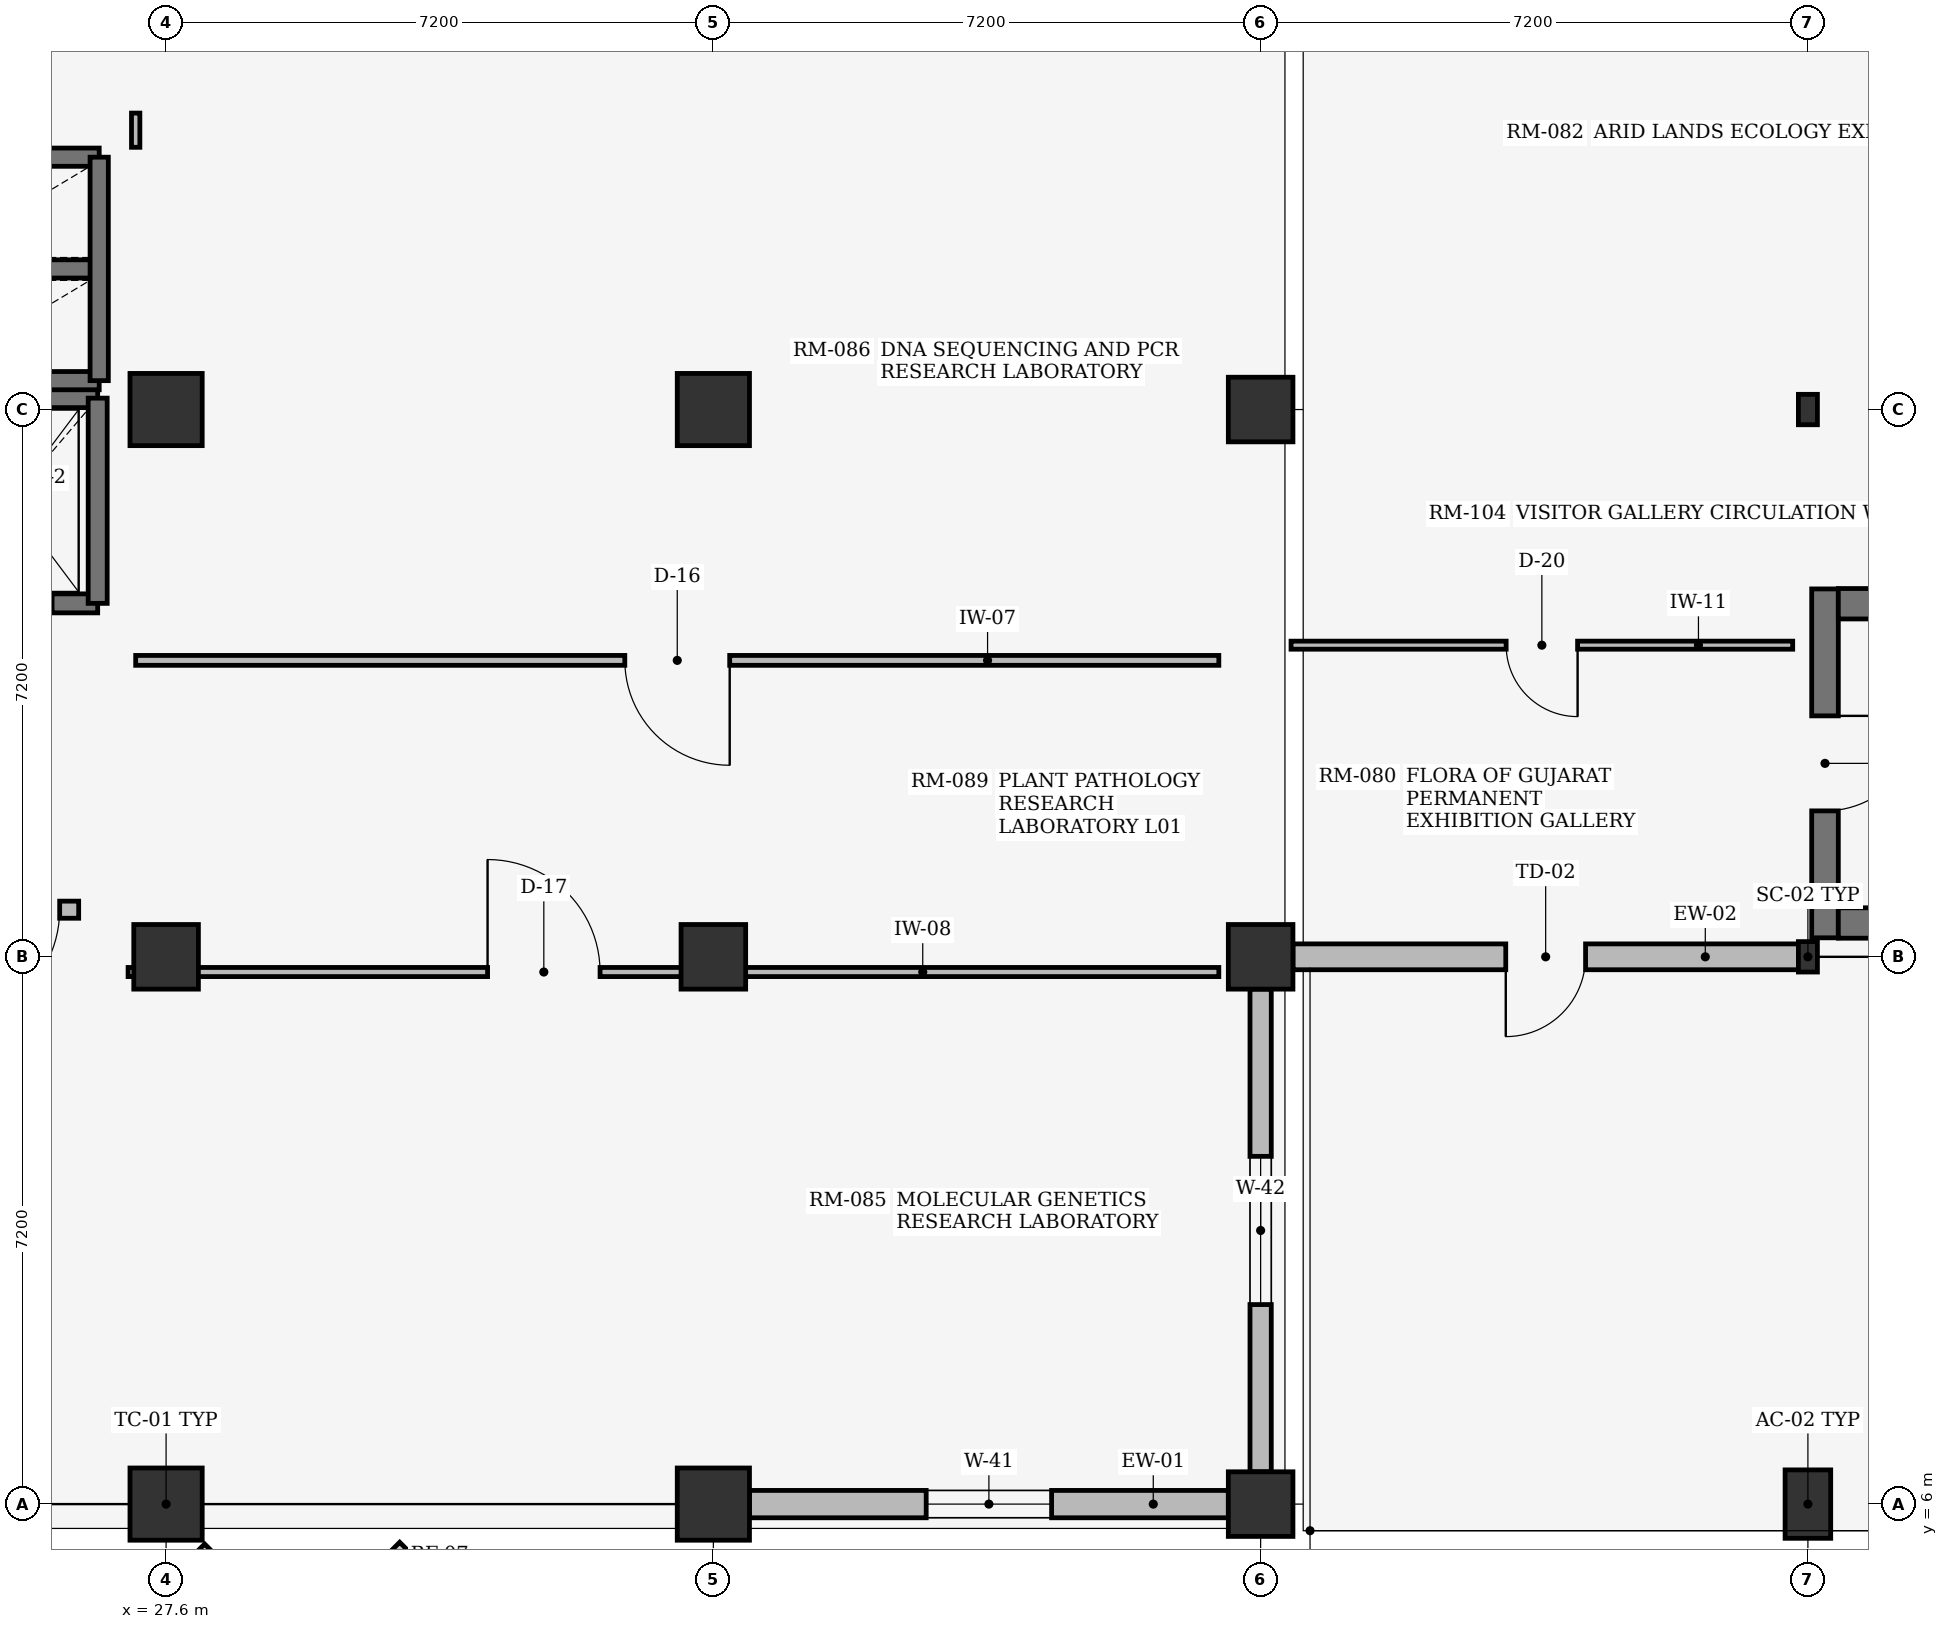
"""IFC4 building model, lengths in metres.
Left out: names, types, materials, properties, quantities, classifications, styles, units other than length and angle.
Written with IfcOpenShell. Run it as: python <this file> out.ifc"""

import sys

from ifc_helpers import new_model, si_unit, direction, frame, frame_2d, origin, origin_2d, place, context, subcontext, project, spatial, rectangle, i_section, extrude, element, fill, save


model = new_model("IFC4")
c1 = context("Model", 3, precision=1e-05, world=origin(), true_north=direction((0.0, 1.0)))
c2 = subcontext(c1, "Body", "Model", "MODEL_VIEW")
j1 = project(units=[si_unit("LENGTHUNIT", "METRE"), si_unit("PLANEANGLEUNIT", "RADIAN")], contexts=[c1])
p1 = place(None, origin())
s1 = spatial("IfcSite", under=j1, at=p1, CompositionType="ELEMENT")
p2 = place(p1, origin())
s2 = spatial("IfcBuilding", under=s1, at=p2, CompositionType="ELEMENT")
p3 = place(p2, frame((0.0, 0.0, 4.8)))
s3 = spatial("IfcBuildingStorey", under=s2, at=p3, CompositionType="ELEMENT", Elevation=4.8)
p4 = place(p3, frame((27.6, 6.0, 0.0), z_axis=(0.0, 0.0, 1.0), x_axis=(1.0, 0.0, 0.0)))
e1 = element("IfcColumn", 1, at=p4, inside=s3, PredefinedType="COLUMN", context=c2, shape_type="SweptSolid", body=[
    extrude(rectangle(XDim=0.95, YDim=0.95, at=origin_2d()), origin(), (0.0, 0.0, 1.0), 3.95),
])
p5 = place(p3, frame((27.6, 13.2, 0.0), z_axis=(0.0, 0.0, 1.0), x_axis=(1.0, 0.0, 0.0)))
e2 = element("IfcColumn", 2, at=p5, inside=s3, PredefinedType="COLUMN", context=c2, shape_type="SweptSolid", body=[
    extrude(rectangle(XDim=0.85, YDim=0.85, at=origin_2d()), origin(), (0.0, 0.0, 1.0), 3.95),
])
for number, where, z_axis, x_axis in (
    (3, (27.6, 20.4, 0.0), (0.0, 0.0, 1.0), (1.0, 0.0, 0.0)),
    (4, (34.8, 6.0, 0.0), (0.0, 0.0, 1.0), (1.0, 0.0, 0.0)),
):
    element("IfcColumn", number, at=place(p3, frame(where, z_axis=z_axis, x_axis=x_axis)), inside=s3, PredefinedType="COLUMN", context=c2, shape_type="SweptSolid", body=[
        extrude(rectangle(XDim=0.95, YDim=0.95, at=origin_2d()), origin(), (0.0, 0.0, 1.0), 3.95),
    ])
p6 = place(p3, frame((34.8, 13.2, 0.0), z_axis=(0.0, 0.0, 1.0), x_axis=(1.0, 0.0, 0.0)))
e5 = element("IfcColumn", 5, at=p6, inside=s3, PredefinedType="COLUMN", context=c2, shape_type="SweptSolid", body=[
    extrude(rectangle(XDim=0.85, YDim=0.85, at=origin_2d()), origin(), (0.0, 0.0, 1.0), 3.95),
])
p7 = place(p3, frame((34.8, 20.4, 0.0), z_axis=(0.0, 0.0, 1.0), x_axis=(1.0, 0.0, 0.0)))
e6 = element("IfcColumn", 6, at=p7, inside=s3, PredefinedType="COLUMN", context=c2, shape_type="SweptSolid", body=[
    extrude(rectangle(XDim=0.95, YDim=0.95, at=origin_2d()), origin(), (0.0, 0.0, 1.0), 3.95),
])
for number, where, z_axis, x_axis in (
    (7, (42.0, 6.0, 0.0), (0.0, 0.0, 1.0), (1.0, 0.0, 0.0)),
    (8, (42.0, 13.2, 0.0), (0.0, 0.0, 1.0), (1.0, 0.0, 0.0)),
    (9, (42.0, 20.4, 0.0), (0.0, 0.0, 1.0), (1.0, 0.0, 0.0)),
):
    element("IfcColumn", number, at=place(p3, frame(where, z_axis=z_axis, x_axis=x_axis)), inside=s3, PredefinedType="COLUMN", context=c2, shape_type="SweptSolid", body=[
        extrude(rectangle(XDim=0.85, YDim=0.85, at=origin_2d()), origin(), (0.0, 0.0, 1.0), 3.95),
    ])
p8 = place(p3, frame((49.2, 6.0, 0.0), z_axis=(0.0, 0.0, 1.0), x_axis=(1.0, 0.0, 0.0)))
e10 = element("IfcColumn", 10, at=p8, inside=s3, PredefinedType="PILASTER", context=c2, shape_type="SweptSolid", body=[
    extrude(rectangle(XDim=0.6, YDim=0.9, at=origin_2d()), origin(), (0.0, 0.0, 1.0), 3.95),
])
for number, where, z_axis, x_axis in (
    (11, (49.2, 13.2, 0.0), (0.0, 0.0, 1.0), (1.0, 0.0, 0.0)),
    (12, (49.2, 20.4, 0.0), (0.0, 0.0, 1.0), (1.0, 0.0, 0.0)),
):
    element("IfcColumn", number, at=place(p3, frame(where, z_axis=z_axis, x_axis=x_axis)), inside=s3, PredefinedType="COLUMN", context=c2, shape_type="SweptSolid", body=[
        extrude(i_section(OverallWidth=0.25, OverallDepth=0.4, WebThickness=0.01, FlangeThickness=0.013, at=origin_2d()), origin(), (0.0, 0.0, 1.0), 3.95),
    ])
p9 = place(p3, frame((42.425, 13.2, 0.0), z_axis=(0.0, 0.0, 1.0), x_axis=(1.0, 0.0, 0.0)))
e13 = element("IfcWall", 13, at=p9, inside=s3, PredefinedType="STANDARD", context=c2, shape_type="SweptSolid", body=[
    extrude(rectangle(XDim=6.65, YDim=0.34, at=frame_2d((3.325, 0.0))), origin(), (0.0, 0.0, 1.0), 3.41),
])
p10 = place(p9, frame((2.8, 0.0, 0.0)))
e14 = element("IfcOpeningElement", 14, at=p10, cuts=e13, PredefinedType="OPENING", context=c2, shape_type="SweptSolid", body=[
    extrude(rectangle(XDim=1.05, YDim=2.15, at=frame_2d((0.525, 1.075))), frame((0.0, 0.18, 0.0), z_axis=(0.0, -1.0, 0.0), x_axis=(1.0, 0.0, 0.0)), (0.0, 0.0, 1.0), 0.36),
])
p11 = place(p3, frame((35.275, 6.0, 0.0), z_axis=(0.0, 0.0, 1.0), x_axis=(1.0, 0.0, 0.0)))
e15 = element("IfcWall", 15, at=p11, inside=s3, PredefinedType="STANDARD", context=c2, shape_type="SweptSolid", body=[
    extrude(rectangle(XDim=6.3, YDim=0.36, at=frame_2d((3.15, 0.0))), origin(), (0.0, 0.0, 1.0), 3.33),
])
p12 = place(p11, frame((2.325, 0.0, 0.75)))
e16 = element("IfcOpeningElement", 16, at=p12, cuts=e15, PredefinedType="OPENING", context=c2, shape_type="SweptSolid", body=[
    extrude(rectangle(XDim=1.65, YDim=1.5, at=frame_2d((0.825, 0.75))), frame((0.0, 0.19, 0.0), z_axis=(0.0, -1.0, 0.0), x_axis=(1.0, 0.0, 0.0)), (0.0, 0.0, 1.0), 0.38),
])
p13 = place(p3, frame((42.0, 6.425, 0.0), z_axis=(0.0, 0.0, 1.0), x_axis=(0.0, 1.0, 0.0)))
e17 = element("IfcWall", 17, at=p13, inside=s3, PredefinedType="STANDARD", context=c2, shape_type="SweptSolid", body=[
    extrude(rectangle(XDim=6.35, YDim=0.28, at=frame_2d((3.175, 0.0))), origin(), (0.0, 0.0, 1.0), 3.33),
])
p14 = place(p13, frame((2.2, 0.0, 0.75)))
e18 = element("IfcOpeningElement", 18, at=p14, cuts=e17, PredefinedType="OPENING", context=c2, shape_type="SweptSolid", body=[
    extrude(rectangle(XDim=1.95, YDim=1.5, at=frame_2d((0.975, 0.75))), frame((0.0, 0.15, 0.0), z_axis=(0.0, -1.0, 0.0), x_axis=(1.0, 0.0, 0.0)), (0.0, 0.0, 1.0), 0.3),
])
p15 = place(p3, frame((49.425, 13.45, 0.0), z_axis=(0.0, 0.0, 1.0), x_axis=(0.0, 1.0, 0.0)))
e19 = element("IfcWall", 19, at=p15, inside=s3, PredefinedType="SHEAR", context=c2, shape_type="SweptSolid", body=[
    extrude(rectangle(XDim=4.59, YDim=0.35, at=frame_2d((2.295, 0.0))), origin(), (0.0, 0.0, 1.0), 3.95),
])
p16 = place(p15, frame((1.67, 0.0, 0.0)))
e20 = element("IfcOpeningElement", 20, at=p16, cuts=e19, PredefinedType="OPENING", context=c2, shape_type="SweptSolid", body=[
    extrude(rectangle(XDim=1.25, YDim=2.2, at=frame_2d((0.625, 1.1))), frame((0.0, 0.185, 0.0), z_axis=(0.0, -1.0, 0.0), x_axis=(1.0, 0.0, 0.0)), (0.0, 0.0, 1.0), 0.37),
])
for number, where, z_axis, x_axis in (
    (21, (49.6, 13.645, 0.0), (0.0, 0.0, 1.0), (1.0, 0.0, 0.0)),
    (22, (49.6, 17.845, 0.0), (0.0, 0.0, 1.0), (1.0, 0.0, 0.0)),
):
    element("IfcWall", number, at=place(p3, frame(where, z_axis=z_axis, x_axis=x_axis)), inside=s3, PredefinedType="SHEAR", context=c2, shape_type="SweptSolid", body=[
        extrude(rectangle(XDim=7.98, YDim=0.4, at=frame_2d((3.99, 0.0))), origin(), (0.0, 0.0, 1.0), 3.95),
    ])
p17 = place(p3, frame((24.4, 17.85, 0.0), z_axis=(0.0, 0.0, 1.0), x_axis=(1.0, 0.0, 0.0)))
e23 = element("IfcWall", 23, at=p17, inside=s3, PredefinedType="SHEAR", context=c2, shape_type="SweptSolid", body=[
    extrude(rectangle(XDim=2.3, YDim=0.25, at=frame_2d((1.15, 0.0))), origin(), (0.0, 0.0, 1.0), 3.95),
])
p18 = place(p17, frame((0.6, 0.0, 0.0)))
e24 = element("IfcOpeningElement", 24, at=p18, cuts=e23, PredefinedType="OPENING", context=c2, shape_type="SweptSolid", body=[
    extrude(rectangle(XDim=1.1, YDim=2.2, at=frame_2d((0.55, 1.1))), frame((0.0, 0.135, 0.0), z_axis=(0.0, -1.0, 0.0), x_axis=(1.0, 0.0, 0.0)), (0.0, 0.0, 1.0), 0.27),
])
p19 = place(p3, frame((24.4, 20.55, 0.0), z_axis=(0.0, 0.0, 1.0), x_axis=(1.0, 0.0, 0.0)))
e25 = element("IfcWall", 25, at=p19, inside=s3, PredefinedType="SHEAR", context=c2, shape_type="SweptSolid", body=[
    extrude(rectangle(XDim=2.3, YDim=0.25, at=frame_2d((1.15, 0.0))), origin(), (0.0, 0.0, 1.0), 3.95),
])
p20 = place(p3, frame((26.7, 17.85, 0.0), z_axis=(0.0, 0.0, 1.0), x_axis=(0.0, 1.0, 0.0)))
e26 = element("IfcWall", 26, at=p20, inside=s3, PredefinedType="SHEAR", context=c2, shape_type="SweptSolid", body=[
    extrude(rectangle(XDim=2.7, YDim=0.25, at=frame_2d((1.35, 0.0))), origin(), (0.0, 0.0, 1.0), 3.95),
])
for number, where, z_axis, x_axis in (
    (27, (24.48, 20.78, 0.0), (0.0, 0.0, 1.0), (1.0, 0.0, 0.0)),
    (28, (24.48, 22.25, 0.0), (0.0, 0.0, 1.0), (1.0, 0.0, 0.0)),
    (29, (24.48, 23.72, 0.0), (0.0, 0.0, 1.0), (1.0, 0.0, 0.0)),
):
    element("IfcWall", number, at=place(p3, frame(where, z_axis=z_axis, x_axis=x_axis)), inside=s3, PredefinedType="SHEAR", context=c2, shape_type="SweptSolid", body=[
        extrude(rectangle(XDim=2.24, YDim=0.24, at=frame_2d((1.12, 0.0))), origin(), (0.0, 0.0, 1.0), 3.95),
    ])
p21 = place(p3, frame((26.72, 20.78, 0.0), z_axis=(0.0, 0.0, 1.0), x_axis=(0.0, 1.0, 0.0)))
e30 = element("IfcWall", 30, at=p21, inside=s3, PredefinedType="SHEAR", context=c2, shape_type="SweptSolid", body=[
    extrude(rectangle(XDim=2.94, YDim=0.24, at=frame_2d((1.47, 0.0))), origin(), (0.0, 0.0, 1.0), 3.95),
])
p22 = place(p3, frame((24.45, 13.82, 0.0), z_axis=(0.0, 0.0, 1.0), x_axis=(1.0, 0.0, 0.0)))
e31 = element("IfcWall", 31, at=p22, inside=s3, PredefinedType="SOLIDWALL", context=c2, shape_type="SweptSolid", body=[
    extrude(rectangle(XDim=2.0, YDim=0.225, at=frame_2d((1.0, 0.0))), origin(), (0.0, 0.0, 1.0), 3.93),
])
p23 = place(p22, frame((0.25, 0.0, 0.0)))
e32 = element("IfcOpeningElement", 32, at=p23, cuts=e31, PredefinedType="OPENING", context=c2, shape_type="SweptSolid", body=[
    extrude(rectangle(XDim=1.5, YDim=2.2, at=frame_2d((0.75, 1.1))), frame((0.0, 0.123, 0.0), z_axis=(0.0, -1.0, 0.0), x_axis=(1.0, 0.0, 0.0)), (0.0, 0.0, 1.0), 0.245),
])
p24 = place(p3, frame((27.2, 17.1, 0.0), z_axis=(0.0, 0.0, 1.0), x_axis=(1.0, 0.0, 0.0)))
e33 = element("IfcWall", 33, at=p24, inside=s3, PredefinedType="PARTITIONING", context=c2, shape_type="SweptSolid", body=[
    extrude(rectangle(XDim=14.25, YDim=0.13, at=frame_2d((7.125, 0.0))), origin(), (0.0, 0.0, 1.0), 3.93),
])
p25 = place(p24, frame((6.435, 0.0, 0.0)))
e34 = element("IfcOpeningElement", 34, at=p25, cuts=e33, PredefinedType="OPENING", context=c2, shape_type="SweptSolid", body=[
    extrude(rectangle(XDim=1.38, YDim=2.15, at=frame_2d((0.69, 1.075))), frame((0.0, 0.075, 0.0), z_axis=(0.0, -1.0, 0.0), x_axis=(1.0, 0.0, 0.0)), (0.0, 0.0, 1.0), 0.15),
])
p26 = place(p3, frame((27.1, 13.0, 0.0), z_axis=(0.0, 0.0, 1.0), x_axis=(1.0, 0.0, 0.0)))
e35 = element("IfcWall", 35, at=p26, inside=s3, PredefinedType="PARTITIONING", context=c2, shape_type="SweptSolid", body=[
    extrude(rectangle(XDim=14.35, YDim=0.12, at=frame_2d((7.175, 0.0))), origin(), (0.0, 0.0, 1.0), 3.93),
])
p27 = place(p26, frame((4.729, 0.0, 0.0)))
e36 = element("IfcOpeningElement", 36, at=p27, cuts=e35, PredefinedType="OPENING", context=c2, shape_type="SweptSolid", body=[
    extrude(rectangle(XDim=1.48, YDim=2.2, at=frame_2d((0.74, 1.1))), frame((0.0, 0.07, 0.0), z_axis=(0.0, -1.0, 0.0), x_axis=(1.0, 0.0, 0.0)), (0.0, 0.0, 1.0), 0.14),
])
p28 = place(p3, frame((27.2, 24.3, 0.0), z_axis=(0.0, 0.0, 1.0), x_axis=(0.0, -1.0, 0.0)))
e37 = element("IfcWall", 37, at=p28, inside=s3, PredefinedType="PARTITIONING", context=c2, shape_type="SweptSolid", body=[
    extrude(rectangle(XDim=0.45, YDim=0.11, at=frame_2d((0.225, 0.0))), origin(), (0.0, 0.0, 1.0), 3.93),
])
p29 = place(p3, frame((42.4, 17.3, 0.0), z_axis=(0.0, 0.0, 1.0), x_axis=(1.0, 0.0, 0.0)))
e38 = element("IfcWall", 38, at=p29, inside=s3, PredefinedType="PARTITIONING", context=c2, shape_type="SweptSolid", body=[
    extrude(rectangle(XDim=6.6, YDim=0.106, at=frame_2d((3.3, 0.0))), origin(), (0.0, 0.0, 1.0), 3.93),
])
p30 = place(p29, frame((2.83, 0.0, 0.0)))
e39 = element("IfcOpeningElement", 39, at=p30, cuts=e38, PredefinedType="OPENING", context=c2, shape_type="SweptSolid", body=[
    extrude(rectangle(XDim=0.94, YDim=2.18, at=frame_2d((0.47, 1.09))), frame((0.0, 0.063, 0.0), z_axis=(0.0, -1.0, 0.0), x_axis=(1.0, 0.0, 0.0)), (0.0, 0.0, 1.0), 0.126),
])
p31 = place(p10, frame((1.05, 0.0, 0.0), z_axis=(0.0, 0.0, 1.0), x_axis=(-1.0, 0.0, 0.0)))
e40 = element("IfcDoor", 40, at=p31, inside=s3, OperationType="SINGLE_SWING_LEFT", PredefinedType="DOOR", context=c2, shape_type="SweptSolid", body=[
    extrude(rectangle(XDim=1.05, YDim=2.15, at=frame_2d((0.525, 1.075))), frame((0.0, 0.025, 0.0), z_axis=(0.0, -1.0, 0.0), x_axis=(1.0, 0.0, 0.0)), (0.0, 0.0, 1.0), 0.05),
])
fill(e14, e40)
p32 = place(p12, origin())
e41 = element("IfcWindow", 41, at=p32, inside=s3, PartitioningType="SINGLE_PANEL", PredefinedType="WINDOW", context=c2, shape_type="SweptSolid", body=[
    extrude(rectangle(XDim=1.65, YDim=1.5, at=frame_2d((0.825, 0.75))), frame((0.0, 0.03, 0.0), z_axis=(0.0, -1.0, 0.0), x_axis=(1.0, 0.0, 0.0)), (0.0, 0.0, 1.0), 0.06),
])
fill(e16, e41)
p33 = place(p14, origin())
e42 = element("IfcWindow", 42, at=p33, inside=s3, PartitioningType="SINGLE_PANEL", PredefinedType="WINDOW", context=c2, shape_type="SweptSolid", body=[
    extrude(rectangle(XDim=1.95, YDim=1.5, at=frame_2d((0.975, 0.75))), frame((0.0, 0.03, 0.0), z_axis=(0.0, -1.0, 0.0), x_axis=(1.0, 0.0, 0.0)), (0.0, 0.0, 1.0), 0.06),
])
fill(e18, e42)
p34 = place(p16, origin())
e43 = element("IfcDoor", 43, at=p34, inside=s3, OperationType="SINGLE_SWING_RIGHT", PredefinedType="DOOR", context=c2, shape_type="SweptSolid", body=[
    extrude(rectangle(XDim=1.25, YDim=2.2, at=frame_2d((0.625, 1.1))), frame((0.0, 0.025, 0.0), z_axis=(0.0, -1.0, 0.0), x_axis=(1.0, 0.0, 0.0)), (0.0, 0.0, 1.0), 0.05),
])
fill(e20, e43)
p35 = place(p23, frame((1.5, 0.0, 0.0), z_axis=(0.0, 0.0, 1.0), x_axis=(-1.0, 0.0, 0.0)))
e44 = element("IfcDoor", 44, at=p35, inside=s3, OperationType="SINGLE_SWING_LEFT", PredefinedType="DOOR", context=c2, shape_type="SweptSolid", body=[
    extrude(rectangle(XDim=1.5, YDim=2.2, at=frame_2d((0.75, 1.1))), frame((0.0, 0.025, 0.0), z_axis=(0.0, -1.0, 0.0), x_axis=(1.0, 0.0, 0.0)), (0.0, 0.0, 1.0), 0.05),
])
fill(e32, e44)
p36 = place(p25, origin())
e45 = element("IfcDoor", 45, at=p36, inside=s3, OperationType="SINGLE_SWING_RIGHT", PredefinedType="DOOR", context=c2, shape_type="SweptSolid", body=[
    extrude(rectangle(XDim=1.38, YDim=2.15, at=frame_2d((0.69, 1.075))), frame((0.0, 0.025, 0.0), z_axis=(0.0, -1.0, 0.0), x_axis=(1.0, 0.0, 0.0)), (0.0, 0.0, 1.0), 0.05),
])
fill(e34, e45)
p37 = place(p27, origin())
e46 = element("IfcDoor", 46, at=p37, inside=s3, OperationType="SINGLE_SWING_LEFT", PredefinedType="DOOR", context=c2, shape_type="SweptSolid", body=[
    extrude(rectangle(XDim=1.48, YDim=2.2, at=frame_2d((0.74, 1.1))), frame((0.0, 0.025, 0.0), z_axis=(0.0, -1.0, 0.0), x_axis=(1.0, 0.0, 0.0)), (0.0, 0.0, 1.0), 0.05),
])
fill(e36, e46)
p38 = place(p30, origin())
e47 = element("IfcDoor", 47, at=p38, inside=s3, OperationType="SINGLE_SWING_RIGHT", PredefinedType="DOOR", context=c2, shape_type="SweptSolid", body=[
    extrude(rectangle(XDim=0.94, YDim=2.18, at=frame_2d((0.47, 1.09))), frame((0.0, 0.025, 0.0), z_axis=(0.0, -1.0, 0.0), x_axis=(1.0, 0.0, 0.0)), (0.0, 0.0, 1.0), 0.05),
])
fill(e39, e47)
save(model, sys.argv[1])
